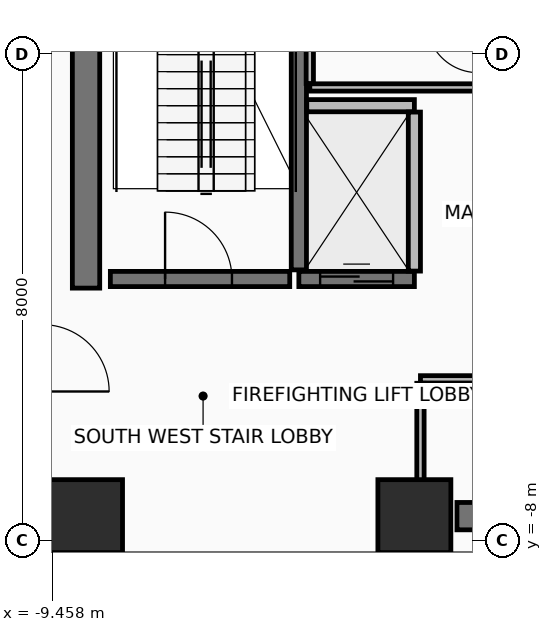
"""IFC4 building model, lengths in metres.
Left out: names, types, materials, properties, quantities, classifications, styles, units other than length and angle.
Written with IfcOpenShell. Run it as: python <this file> out.ifc"""

import sys

from ifc_helpers import new_model, si_unit, direction, frame, frame_2d, origin, origin_2d, place, context, subcontext, project, spatial, rectangle, extrude, element, fill, save


model = new_model("IFC4")
c1 = context("Model", 3, precision=1e-05, world=origin(), true_north=direction((0.0, 1.0)))
c2 = subcontext(c1, "Body", "Model", "MODEL_VIEW")
j1 = project(units=[si_unit("LENGTHUNIT", "METRE"), si_unit("PLANEANGLEUNIT", "RADIAN")], contexts=[c1])
p1 = place(None, origin())
s1 = spatial("IfcSite", under=j1, at=p1, CompositionType="ELEMENT")
p2 = place(p1, origin())
s2 = spatial("IfcBuilding", under=s1, at=p2, CompositionType="ELEMENT")
p3 = place(p2, frame((0.0, 0.0, 196.85)))
s3 = spatial("IfcBuildingStorey", under=s2, at=p3, CompositionType="ELEMENT", Elevation=196.85)
for number, where, z_axis, x_axis in (
    (1, (-8.9, -7.6, 0.0), (0.0, 0.0, 1.0), (1.0, 0.0, 0.0)),
    (2, (-3.5, -7.6, 0.0), (0.0, 0.0, 1.0), (1.0, 0.0, 0.0)),
):
    element("IfcColumn", number, at=place(p3, frame(where, z_axis=z_axis, x_axis=x_axis)), inside=s3, PredefinedType="COLUMN", context=c2, shape_type="SweptSolid", body=[
        extrude(rectangle(XDim=1.2, YDim=1.2, at=origin_2d()), origin(), (0.0, 0.0, 1.0), 3.6),
    ])
p4 = place(p3, frame((-2.8, -7.6, 0.0), z_axis=(0.0, 0.0, 1.0), x_axis=(1.0, 0.0, 0.0)))
e3 = element("IfcWall", 3, at=p4, inside=s3, PredefinedType="SHEAR", context=c2, shape_type="SweptSolid", body=[
    extrude(rectangle(XDim=5.38, YDim=0.45, at=frame_2d((2.69, 0.0))), origin(), (0.0, 0.0, 1.0), 3.42),
])
p5 = place(p3, frame((-8.9, -3.85, 0.0), z_axis=(0.0, 0.0, 1.0), x_axis=(0.0, 1.0, 0.0)))
e4 = element("IfcWall", 4, at=p5, inside=s3, PredefinedType="SHEAR", context=c2, shape_type="SweptSolid", body=[
    extrude(rectangle(XDim=10.7, YDim=0.45, at=frame_2d((5.35, 0.0))), origin(), (0.0, 0.0, 1.0), 3.42),
])
p6 = place(p3, frame((-5.4, -3.55, 0.0), z_axis=(0.0, 0.0, 1.0), x_axis=(0.0, 1.0, 0.0)))
e5 = element("IfcWall", 5, at=p6, inside=s3, PredefinedType="SHEAR", context=c2, shape_type="SweptSolid", body=[
    extrude(rectangle(XDim=7.3, YDim=0.25, at=frame_2d((3.65, 0.0))), origin(), (0.0, 0.0, 1.0), 3.42),
])
p7 = place(p3, frame((-8.5, -3.7, 0.0), z_axis=(0.0, 0.0, 1.0), x_axis=(1.0, 0.0, 0.0)))
e6 = element("IfcWall", 6, at=p7, inside=s3, PredefinedType="SHEAR", context=c2, shape_type="SweptSolid", body=[
    extrude(rectangle(XDim=2.95, YDim=0.25, at=frame_2d((1.475, 0.0))), origin(), (0.0, 0.0, 1.0), 3.42),
])
p8 = place(p7, frame((0.9, 0.0, 0.0)))
e7 = element("IfcOpeningElement", 7, at=p8, cuts=e6, PredefinedType="OPENING", context=c2, shape_type="SweptSolid", body=[
    extrude(rectangle(XDim=1.1, YDim=2.15, at=frame_2d((0.55, 1.075))), frame((0.0, 0.135, 0.0), z_axis=(0.0, -1.0, 0.0), x_axis=(1.0, 0.0, 0.0)), (0.0, 0.0, 1.0), 0.27),
])
p9 = place(p3, frame((-5.4, -3.7, 0.0), z_axis=(0.0, 0.0, 1.0), x_axis=(1.0, 0.0, 0.0)))
e8 = element("IfcWall", 8, at=p9, inside=s3, PredefinedType="SHEAR", context=c2, shape_type="SweptSolid", body=[
    extrude(rectangle(XDim=1.9, YDim=0.25, at=frame_2d((0.95, 0.0))), origin(), (0.0, 0.0, 1.0), 3.42),
])
p10 = place(p9, frame((0.35, 0.0, 0.0)))
e9 = element("IfcOpeningElement", 9, at=p10, cuts=e8, PredefinedType="OPENING", context=c2, shape_type="SweptSolid", body=[
    extrude(rectangle(XDim=1.2, YDim=2.2, at=frame_2d((0.6, 1.1))), frame((0.0, 0.135, 0.0), z_axis=(0.0, -1.0, 0.0), x_axis=(1.0, 0.0, 0.0)), (0.0, 0.0, 1.0), 0.27),
])
p11 = place(p3, frame((-5.27, -0.85, 0.0), z_axis=(0.0, 0.0, 1.0), x_axis=(1.0, 0.0, 0.0)))
e10 = element("IfcWall", 10, at=p11, inside=s3, PredefinedType="PARTITIONING", context=c2, shape_type="SweptSolid", body=[
    extrude(rectangle(XDim=1.77, YDim=0.2, at=frame_2d((0.885, 0.0))), origin(), (0.0, 0.0, 1.0), 3.42),
])
p12 = place(p3, frame((-3.5, -3.57, 0.0), z_axis=(0.0, 0.0, 1.0), x_axis=(0.0, 1.0, 0.0)))
e11 = element("IfcWall", 11, at=p12, inside=s3, PredefinedType="PARTITIONING", context=c2, shape_type="SweptSolid", body=[
    extrude(rectangle(XDim=2.615, YDim=0.2, at=frame_2d((1.308, 0.0))), origin(), (0.0, 0.0, 1.0), 3.42),
])
p13 = place(p3, frame((-5.22, -0.55, 0.0), z_axis=(0.0, 0.0, 1.0), x_axis=(1.0, 0.0, 0.0)))
e12 = element("IfcWall", 12, at=p13, inside=s3, PredefinedType="PARTITIONING", context=c2, shape_type="SweptSolid", body=[
    extrude(rectangle(XDim=2.77, YDim=0.12, at=frame_2d((1.385, 0.0))), origin(), (0.0, 0.0, 1.0), 3.42),
])
p14 = place(p3, frame((-5.22, 0.655, 0.0), z_axis=(0.0, 0.0, 1.0), x_axis=(0.0, -1.0, 0.0)))
e13 = element("IfcWall", 13, at=p14, inside=s3, PredefinedType="PARTITIONING", context=c2, shape_type="SweptSolid", body=[
    extrude(rectangle(XDim=1.14, YDim=0.12, at=frame_2d((0.57, 0.0))), origin(), (0.0, 0.0, 1.0), 3.42),
])
p15 = place(p3, frame((-0.265, -5.35, 0.0), z_axis=(0.0, 0.0, 1.0), x_axis=(-1.0, 0.0, 0.0)))
e14 = element("IfcWall", 14, at=p15, inside=s3, PredefinedType="PARTITIONING", context=c2, shape_type="SweptSolid", body=[
    extrude(rectangle(XDim=3.135, YDim=0.12, at=frame_2d((1.567, 0.0))), origin(), (0.0, 0.0, 1.0), 2.715),
])
p16 = place(p3, frame((-3.4, -5.415, 0.0), z_axis=(0.0, 0.0, 1.0), x_axis=(0.0, -1.0, 0.0)))
e15 = element("IfcWall", 15, at=p16, inside=s3, PredefinedType="PARTITIONING", context=c2, shape_type="SweptSolid", body=[
    extrude(rectangle(XDim=2.8, YDim=0.12, at=frame_2d((1.4, 0.0))), origin(), (0.0, 0.0, 1.0), 2.715),
])
p17 = place(p8, origin())
e16 = element("IfcDoor", 16, at=p17, inside=s3, OperationType="SINGLE_SWING_LEFT", PredefinedType="DOOR", context=c2, shape_type="SweptSolid", body=[
    extrude(rectangle(XDim=1.1, YDim=2.15, at=frame_2d((0.55, 1.075))), frame((0.0, 0.025, 0.0), z_axis=(0.0, -1.0, 0.0), x_axis=(1.0, 0.0, 0.0)), (0.0, 0.0, 1.0), 0.05),
])
fill(e7, e16)
p18 = place(p10, origin())
e17 = element("IfcDoor", 17, at=p18, inside=s3, OperationType="SLIDING_TO_RIGHT", PredefinedType="DOOR", context=c2, shape_type="SweptSolid", body=[
    extrude(rectangle(XDim=1.2, YDim=2.2, at=frame_2d((0.6, 1.1))), frame((0.0, 0.025, 0.0), z_axis=(0.0, -1.0, 0.0), x_axis=(1.0, 0.0, 0.0)), (0.0, 0.0, 1.0), 0.05),
])
fill(e9, e17)
save(model, sys.argv[1])
